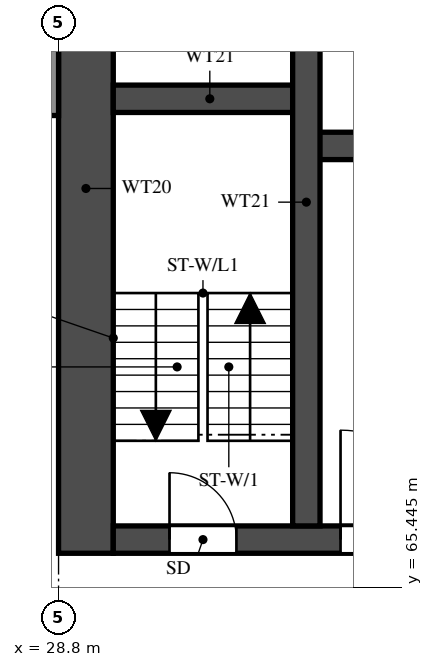
"""IFC4 building model, lengths in metres.
Left out: names, types, materials, properties, quantities, classifications, styles, units other than length and angle.
Written with IfcOpenShell. Run it as: python <this file> out.ifc"""

import sys

from ifc_helpers import new_model, si_unit, direction, frame, frame_2d, origin, place, context, subcontext, project, spatial, rectangle, extrude, element, fill, save


model = new_model("IFC4")
c1 = context("Model", 3, precision=1e-05, world=origin(), true_north=direction((0.0, 1.0)))
c2 = subcontext(c1, "Body", "Model", "MODEL_VIEW")
j1 = project(units=[si_unit("LENGTHUNIT", "METRE"), si_unit("PLANEANGLEUNIT", "RADIAN")], contexts=[c1])
p1 = place(None, origin())
s1 = spatial("IfcSite", under=j1, at=p1, CompositionType="ELEMENT")
p2 = place(p1, origin())
s2 = spatial("IfcBuilding", under=s1, at=p2, CompositionType="ELEMENT")
p3 = place(p2, frame((0.0, 0.0, 76.0)))
s3 = spatial("IfcBuildingStorey", under=s2, at=p3, CompositionType="ELEMENT", Elevation=76.0)
p4 = place(p3, frame((29.25, 66.0, 0.0), z_axis=(0.0, 0.0, 1.0), x_axis=(0.0, 1.0, 0.0)))
e1 = element("IfcWall", 1, at=p4, inside=s3, PredefinedType="SHEAR", context=c2, shape_type="SweptSolid", body=[
    extrude(rectangle(XDim=12.0, YDim=0.9, at=frame_2d((6.0, 0.0))), origin(), (0.0, 0.0, 1.0), 3.18),
])
p5 = place(p3, frame((29.7, 66.225, 0.0), z_axis=(0.0, 0.0, 1.0), x_axis=(1.0, 0.0, 0.0)))
e2 = element("IfcWall", 2, at=p5, inside=s3, PredefinedType="SHEAR", context=c2, shape_type="SweptSolid", body=[
    extrude(rectangle(XDim=41.4, YDim=0.45, at=frame_2d((20.7, 0.0))), origin(), (0.0, 0.0, 1.0), 3.18),
])
p6 = place(p5, frame((0.925, 0.0, 0.0)))
e3 = element("IfcOpeningElement", 3, at=p6, cuts=e2, PredefinedType="OPENING", context=c2, shape_type="SweptSolid", body=[
    extrude(rectangle(XDim=1.1, YDim=2.1, at=frame_2d((0.55, 1.05))), frame((0.0, 0.235, 0.0), z_axis=(0.0, -1.0, 0.0), x_axis=(1.0, 0.0, 0.0)), (0.0, 0.0, 1.0), 0.47),
])
p7 = place(p5, frame((3.738, 0.0, 0.0)))
e4 = element("IfcOpeningElement", 4, at=p7, cuts=e2, PredefinedType="OPENING", context=c2, shape_type="SweptSolid", body=[
    extrude(rectangle(XDim=1.8, YDim=2.1, at=frame_2d((0.9, 1.05))), frame((0.0, 0.235, 0.0), z_axis=(0.0, -1.0, 0.0), x_axis=(1.0, 0.0, 0.0)), (0.0, 0.0, 1.0), 0.47),
])
p8 = place(p3, frame((32.875, 72.7, 0.0), z_axis=(0.0, 0.0, 1.0), x_axis=(1.0, 0.0, 0.0)))
e5 = element("IfcWall", 5, at=p8, inside=s3, PredefinedType="SHEAR", context=c2, shape_type="SweptSolid", body=[
    extrude(rectangle(XDim=35.05, YDim=0.45, at=frame_2d((17.525, 0.0))), origin(), (0.0, 0.0, 1.0), 3.18),
])
p9 = place(p8, frame((19.8, 0.0, 0.0)))
e6 = element("IfcOpeningElement", 6, at=p9, cuts=e5, PredefinedType="OPENING", context=c2, shape_type="SweptSolid", body=[
    extrude(rectangle(XDim=1.1, YDim=2.1, at=frame_2d((0.55, 1.05))), frame((0.0, 0.235, 0.0), z_axis=(0.0, -1.0, 0.0), x_axis=(1.0, 0.0, 0.0)), (0.0, 0.0, 1.0), 0.47),
])
p10 = place(p8, frame((27.65, 0.0, 0.0)))
e7 = element("IfcOpeningElement", 7, at=p10, cuts=e5, PredefinedType="OPENING", context=c2, shape_type="SweptSolid", body=[
    extrude(rectangle(XDim=1.1, YDim=2.1, at=frame_2d((0.55, 1.05))), frame((0.0, 0.235, 0.0), z_axis=(0.0, -1.0, 0.0), x_axis=(1.0, 0.0, 0.0)), (0.0, 0.0, 1.0), 0.47),
])
p11 = place(p8, frame((30.25, 0.0, 0.0)))
e8 = element("IfcOpeningElement", 8, at=p11, cuts=e5, PredefinedType="OPENING", context=c2, shape_type="SweptSolid", body=[
    extrude(rectangle(XDim=1.1, YDim=2.1, at=frame_2d((0.55, 1.05))), frame((0.0, 0.235, 0.0), z_axis=(0.0, -1.0, 0.0), x_axis=(1.0, 0.0, 0.0)), (0.0, 0.0, 1.0), 0.47),
])
p12 = place(p8, frame((3.75, 0.0, 0.0)))
e9 = element("IfcOpeningElement", 9, at=p12, cuts=e5, PredefinedType="OPENING", context=c2, shape_type="SweptSolid", body=[
    extrude(rectangle(XDim=1.1, YDim=2.1, at=frame_2d((0.55, 1.05))), frame((0.0, 0.235, 0.0), z_axis=(0.0, -1.0, 0.0), x_axis=(1.0, 0.0, 0.0)), (0.0, 0.0, 1.0), 0.47),
])
p13 = place(p8, frame((6.5, 0.0, 0.0)))
e10 = element("IfcOpeningElement", 10, at=p13, cuts=e5, PredefinedType="OPENING", context=c2, shape_type="SweptSolid", body=[
    extrude(rectangle(XDim=1.1, YDim=2.1, at=frame_2d((0.55, 1.05))), frame((0.0, 0.235, 0.0), z_axis=(0.0, -1.0, 0.0), x_axis=(1.0, 0.0, 0.0)), (0.0, 0.0, 1.0), 0.47),
])
p14 = place(p8, frame((9.25, 0.0, 0.0)))
e11 = element("IfcOpeningElement", 11, at=p14, cuts=e5, PredefinedType="OPENING", context=c2, shape_type="SweptSolid", body=[
    extrude(rectangle(XDim=1.1, YDim=2.1, at=frame_2d((0.55, 1.05))), frame((0.0, 0.235, 0.0), z_axis=(0.0, -1.0, 0.0), x_axis=(1.0, 0.0, 0.0)), (0.0, 0.0, 1.0), 0.47),
])
p15 = place(p8, frame((12.0, 0.0, 0.0)))
e12 = element("IfcOpeningElement", 12, at=p15, cuts=e5, PredefinedType="OPENING", context=c2, shape_type="SweptSolid", body=[
    extrude(rectangle(XDim=1.1, YDim=2.1, at=frame_2d((0.55, 1.05))), frame((0.0, 0.235, 0.0), z_axis=(0.0, -1.0, 0.0), x_axis=(1.0, 0.0, 0.0)), (0.0, 0.0, 1.0), 0.47),
])
p16 = place(p8, frame((14.75, 0.0, 0.0)))
e13 = element("IfcOpeningElement", 13, at=p16, cuts=e5, PredefinedType="OPENING", context=c2, shape_type="SweptSolid", body=[
    extrude(rectangle(XDim=1.1, YDim=2.1, at=frame_2d((0.55, 1.05))), frame((0.0, 0.235, 0.0), z_axis=(0.0, -1.0, 0.0), x_axis=(1.0, 0.0, 0.0)), (0.0, 0.0, 1.0), 0.47),
])
p17 = place(p8, frame((17.5, 0.0, 0.0)))
e14 = element("IfcOpeningElement", 14, at=p17, cuts=e5, PredefinedType="OPENING", context=c2, shape_type="SweptSolid", body=[
    extrude(rectangle(XDim=1.1, YDim=2.1, at=frame_2d((0.55, 1.05))), frame((0.0, 0.235, 0.0), z_axis=(0.0, -1.0, 0.0), x_axis=(1.0, 0.0, 0.0)), (0.0, 0.0, 1.0), 0.47),
])
p18 = place(p8, frame((0.913, 0.0, 0.0)))
e15 = element("IfcOpeningElement", 15, at=p18, cuts=e5, PredefinedType="OPENING", context=c2, shape_type="SweptSolid", body=[
    extrude(rectangle(XDim=1.1, YDim=2.1, at=frame_2d((0.55, 1.05))), frame((0.0, 0.235, 0.0), z_axis=(0.0, -1.0, 0.0), x_axis=(1.0, 0.0, 0.0)), (0.0, 0.0, 1.0), 0.47),
])
p19 = place(p3, frame((29.7, 73.475, 0.0), z_axis=(0.0, 0.0, 1.0), x_axis=(1.0, 0.0, 0.0)))
e16 = element("IfcWall", 16, at=p19, inside=s3, PredefinedType="SHEAR", context=c2, shape_type="SweptSolid", body=[
    extrude(rectangle(XDim=3.175, YDim=0.45, at=frame_2d((1.587, 0.0))), origin(), (0.0, 0.0, 1.0), 3.18),
])
p20 = place(p3, frame((32.875, 66.45, 0.0), z_axis=(0.0, 0.0, 1.0), x_axis=(0.0, 1.0, 0.0)))
e17 = element("IfcWall", 17, at=p20, inside=s3, PredefinedType="SHEAR", context=c2, shape_type="SweptSolid", body=[
    extrude(rectangle(XDim=10.65, YDim=0.45, at=frame_2d((5.325, 0.0))), origin(), (0.0, 0.0, 1.0), 3.18),
])
p21 = place(p3, frame((28.7, 73.2, 0.0), z_axis=(0.0, 0.0, 1.0), x_axis=(0.0, 1.0, 0.0)))
e18 = element("IfcWall", 18, at=p21, inside=s3, PredefinedType="SOLIDWALL", context=c2, shape_type="SweptSolid", body=[
    extrude(rectangle(XDim=4.8, YDim=0.2, at=frame_2d((2.4, 0.0))), origin(), (0.0, 0.0, 1.0), 3.18),
])
p22 = place(p6, origin())
e19 = element("IfcDoor", 19, at=p22, inside=s3, OperationType="SINGLE_SWING_LEFT", PredefinedType="DOOR", context=c2, shape_type="SweptSolid", body=[
    extrude(rectangle(XDim=1.1, YDim=2.1, at=frame_2d((0.55, 1.05))), frame((0.0, 0.025, 0.0), z_axis=(0.0, -1.0, 0.0), x_axis=(1.0, 0.0, 0.0)), (0.0, 0.0, 1.0), 0.05),
])
fill(e3, e19)
p23 = place(p7, origin())
e20 = element("IfcDoor", 20, at=p23, inside=s3, OperationType="DOUBLE_DOOR_SINGLE_SWING", PredefinedType="DOOR", context=c2, shape_type="SweptSolid", body=[
    extrude(rectangle(XDim=1.8, YDim=2.1, at=frame_2d((0.9, 1.05))), frame((0.0, 0.025, 0.0), z_axis=(0.0, -1.0, 0.0), x_axis=(1.0, 0.0, 0.0)), (0.0, 0.0, 1.0), 0.05),
])
fill(e4, e20)
save(model, sys.argv[1])
